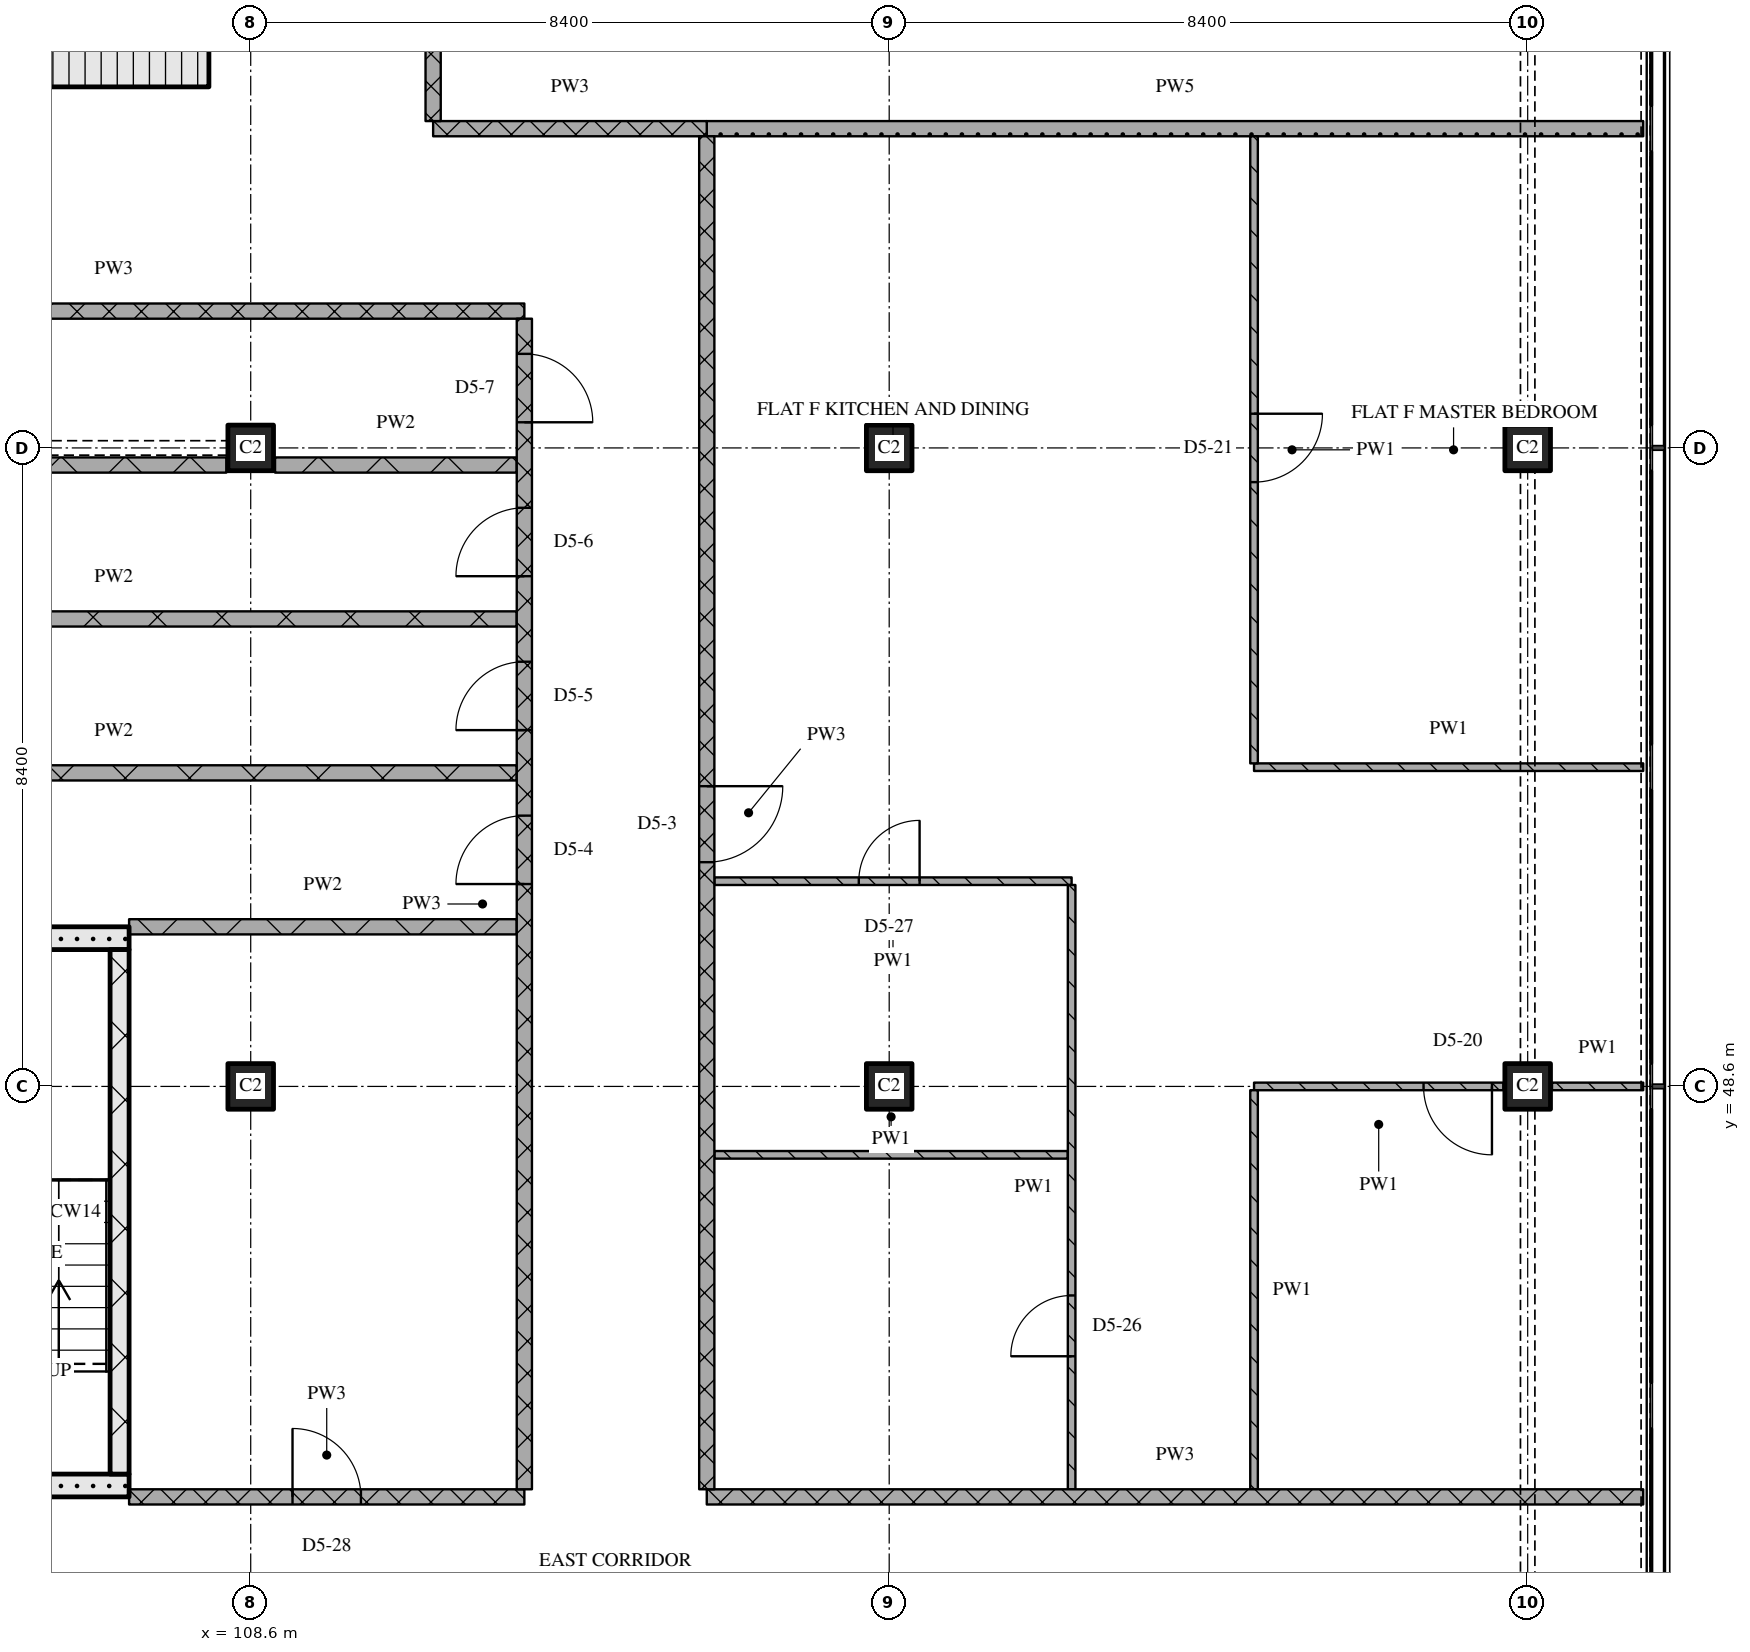
"""IFC4 building model, lengths in metres.
Left out: names, types, materials, properties, quantities, classifications, styles, units other than length and angle.
Written with IfcOpenShell. Run it as: python <this file> out.ifc"""

import sys

from ifc_helpers import new_model, si_unit, direction, frame, frame_2d, origin, origin_2d, place, context, subcontext, project, spatial, rectangle, extrude, element, fill, save


model = new_model("IFC4")
c1 = context("Model", 3, precision=1e-05, world=origin(), true_north=direction((0.0, 1.0)))
c2 = subcontext(c1, "Body", "Model", "MODEL_VIEW")
j1 = project(units=[si_unit("LENGTHUNIT", "METRE"), si_unit("PLANEANGLEUNIT", "RADIAN")], contexts=[c1])
p1 = place(None, origin())
s1 = spatial("IfcSite", under=j1, at=p1, CompositionType="ELEMENT")
p2 = place(p1, origin())
s2 = spatial("IfcBuilding", under=s1, at=p2, CompositionType="ELEMENT")
p3 = place(p2, frame((0.0, 0.0, 248.7)))
s3 = spatial("IfcBuildingStorey", under=s2, at=p3, CompositionType="ELEMENT", Elevation=248.7)
for number, where, z_axis, x_axis in (
    (1, (108.6, 48.6, 0.0), (0.0, 0.0, 1.0), (1.0, 0.0, 0.0)),
    (2, (108.6, 57.0, 0.0), (0.0, 0.0, 1.0), (1.0, 0.0, 0.0)),
    (3, (117.0, 48.6, 0.0), (0.0, 0.0, 1.0), (1.0, 0.0, 0.0)),
    (4, (117.0, 57.0, 0.0), (0.0, 0.0, 1.0), (1.0, 0.0, 0.0)),
    (5, (125.4, 48.6, 0.0), (0.0, 0.0, 1.0), (1.0, 0.0, 0.0)),
    (6, (125.4, 57.0, 0.0), (0.0, 0.0, 1.0), (1.0, 0.0, 0.0)),
):
    element("IfcColumn", number, at=place(p3, frame(where, z_axis=z_axis, x_axis=x_axis)), inside=s3, PredefinedType="COLUMN", context=c2, shape_type="SweptSolid", body=[
        extrude(rectangle(XDim=0.6, YDim=0.6, at=origin_2d()), origin(), (0.0, 0.0, 1.0), 3.6),
    ])
p4 = place(p3, frame((67.15, 62.075, 0.0), z_axis=(0.0, 0.0, 1.0), x_axis=(1.0, 0.0, 0.0)))
e7 = element("IfcWall", 7, at=p4, inside=s3, PredefinedType="SOLIDWALL", context=c2, shape_type="SweptSolid", body=[
    extrude(rectangle(XDim=40.9, YDim=0.65, at=frame_2d((20.45, 0.0))), origin(), (0.0, 0.0, 1.0), 3.3),
])
p5 = place(p4, frame((20.8, 0.0, 0.0)))
e8 = element("IfcOpeningElement", 8, at=p5, cuts=e7, PredefinedType="OPENING", context=c2, shape_type="SweptSolid", body=[
    extrude(rectangle(XDim=1.8, YDim=2.1, at=frame_2d((0.9, 1.05))), frame((0.0, 0.335, 0.0), z_axis=(0.0, -1.0, 0.0), x_axis=(1.0, 0.0, 0.0)), (0.0, 0.0, 1.0), 0.67),
])
p6 = place(p3, frame((101.4, 43.35, 0.0), z_axis=(0.0, 0.0, 1.0), x_axis=(1.0, 0.0, 0.0)))
e9 = element("IfcWall", 9, at=p6, inside=s3, PredefinedType="SOLIDWALL", context=c2, shape_type="SweptSolid", body=[
    extrude(rectangle(XDim=5.6, YDim=0.3, at=frame_2d((2.8, 0.0))), origin(), (0.0, 0.0, 1.0), 3.3),
])
p7 = place(p6, frame((0.725, 0.0, 0.0)))
e10 = element("IfcOpeningElement", 10, at=p7, cuts=e9, PredefinedType="OPENING", context=c2, shape_type="SweptSolid", body=[
    extrude(rectangle(XDim=1.0, YDim=2.1, at=frame_2d((0.5, 1.05))), frame((0.0, 0.16, 0.0), z_axis=(0.0, -1.0, 0.0), x_axis=(1.0, 0.0, 0.0)), (0.0, 0.0, 1.0), 0.32),
])
p8 = place(p3, frame((106.875, 43.5, 0.0), z_axis=(0.0, 0.0, 1.0), x_axis=(0.0, 1.0, 0.0)))
e11 = element("IfcWall", 11, at=p8, inside=s3, PredefinedType="SOLIDWALL", context=c2, shape_type="SweptSolid", body=[
    extrude(rectangle(XDim=6.9, YDim=0.25, at=frame_2d((3.45, 0.0))), origin(), (0.0, 0.0, 1.0), 3.3),
])
p9 = place(p3, frame((101.4, 50.55, 0.0), z_axis=(0.0, 0.0, 1.0), x_axis=(1.0, 0.0, 0.0)))
e12 = element("IfcWall", 12, at=p9, inside=s3, PredefinedType="SOLIDWALL", context=c2, shape_type="SweptSolid", body=[
    extrude(rectangle(XDim=5.6, YDim=0.3, at=frame_2d((2.8, 0.0))), origin(), (0.0, 0.0, 1.0), 3.3),
])
p10 = place(p3, frame((107.0, 43.2, 0.0), z_axis=(0.0, 0.0, 1.0), x_axis=(1.0, 0.0, 0.0)))
e13 = element("IfcWall", 13, at=p10, inside=s3, PredefinedType="PARTITIONING", context=c2, shape_type="SweptSolid", body=[
    extrude(rectangle(XDim=5.2, YDim=0.2, at=frame_2d((2.6, 0.0))), origin(), (0.0, 0.0, 1.0), 3.3),
])
p11 = place(p10, frame((2.15, 0.0, 0.0)))
e14 = element("IfcOpeningElement", 14, at=p11, cuts=e13, PredefinedType="OPENING", context=c2, shape_type="SweptSolid", body=[
    extrude(rectangle(XDim=0.9, YDim=2.1, at=frame_2d((0.45, 1.05))), frame((0.0, 0.11, 0.0), z_axis=(0.0, -1.0, 0.0), x_axis=(1.0, 0.0, 0.0)), (0.0, 0.0, 1.0), 0.22),
])
p12 = place(p3, frame((114.6, 43.2, 0.0), z_axis=(0.0, 0.0, 1.0), x_axis=(1.0, 0.0, 0.0)))
e15 = element("IfcWall", 15, at=p12, inside=s3, PredefinedType="PARTITIONING", context=c2, shape_type="SweptSolid", body=[
    extrude(rectangle(XDim=12.32, YDim=0.2, at=frame_2d((6.16, 0.0))), origin(), (0.0, 0.0, 1.0), 3.3),
])
p13 = place(p3, frame((114.7, 47.7, 0.0), z_axis=(0.0, 0.0, 1.0), x_axis=(1.0, 0.0, 0.0)))
e16 = element("IfcWall", 16, at=p13, inside=s3, PredefinedType="PARTITIONING", context=c2, shape_type="SweptSolid", body=[
    extrude(rectangle(XDim=4.65, YDim=0.1, at=frame_2d((2.325, 0.0))), origin(), (0.0, 0.0, 1.0), 3.3),
])
p14 = place(p3, frame((125.08, 48.6, 0.0), z_axis=(0.0, 0.0, 1.0), x_axis=(-1.0, 0.0, 0.0)))
e17 = element("IfcWall", 17, at=p14, inside=s3, PredefinedType="PARTITIONING", context=c2, shape_type="SweptSolid", body=[
    extrude(rectangle(XDim=3.28, YDim=0.1, at=frame_2d((1.64, 0.0))), origin(), (0.0, 0.0, 1.0), 3.3),
])
p15 = place(p14, frame((0.15, 0.0, 0.0)))
e18 = element("IfcOpeningElement", 18, at=p15, cuts=e17, PredefinedType="OPENING", context=c2, shape_type="SweptSolid", body=[
    extrude(rectangle(XDim=0.9, YDim=2.1, at=frame_2d((0.45, 1.05))), frame((0.0, 0.06, 0.0), z_axis=(0.0, -1.0, 0.0), x_axis=(1.0, 0.0, 0.0)), (0.0, 0.0, 1.0), 0.12),
])
p16 = place(p3, frame((125.72, 48.6, 0.0), z_axis=(0.0, 0.0, 1.0), x_axis=(1.0, 0.0, 0.0)))
e19 = element("IfcWall", 19, at=p16, inside=s3, PredefinedType="PARTITIONING", context=c2, shape_type="SweptSolid", body=[
    extrude(rectangle(XDim=1.2, YDim=0.1, at=frame_2d((0.6, 0.0))), origin(), (0.0, 0.0, 1.0), 3.3),
])
p17 = place(p3, frame((107.0, 50.7, 0.0), z_axis=(0.0, 0.0, 1.0), x_axis=(1.0, 0.0, 0.0)))
e20 = element("IfcWall", 20, at=p17, inside=s3, PredefinedType="PARTITIONING", context=c2, shape_type="SweptSolid", body=[
    extrude(rectangle(XDim=5.1, YDim=0.2, at=frame_2d((2.55, 0.0))), origin(), (0.0, 0.0, 1.0), 3.3),
])
p18 = place(p3, frame((119.4, 51.3, 0.0), z_axis=(0.0, 0.0, 1.0), x_axis=(-1.0, 0.0, 0.0)))
e21 = element("IfcWall", 21, at=p18, inside=s3, PredefinedType="PARTITIONING", context=c2, shape_type="SweptSolid", body=[
    extrude(rectangle(XDim=4.7, YDim=0.1, at=frame_2d((2.35, 0.0))), origin(), (0.0, 0.0, 1.0), 3.3),
])
p19 = place(p18, frame((2.0, 0.0, 0.0)))
e22 = element("IfcOpeningElement", 22, at=p19, cuts=e21, PredefinedType="OPENING", context=c2, shape_type="SweptSolid", body=[
    extrude(rectangle(XDim=0.8, YDim=2.1, at=frame_2d((0.4, 1.05))), frame((0.0, 0.06, 0.0), z_axis=(0.0, -1.0, 0.0), x_axis=(1.0, 0.0, 0.0)), (0.0, 0.0, 1.0), 0.12),
])
p20 = place(p3, frame((101.5, 52.725, 0.0), z_axis=(0.0, 0.0, 1.0), x_axis=(1.0, 0.0, 0.0)))
e23 = element("IfcWall", 23, at=p20, inside=s3, PredefinedType="PARTITIONING", context=c2, shape_type="SweptSolid", body=[
    extrude(rectangle(XDim=10.6, YDim=0.2, at=frame_2d((5.3, 0.0))), origin(), (0.0, 0.0, 1.0), 3.3),
])
p21 = place(p3, frame((121.8, 52.8, 0.0), z_axis=(0.0, 0.0, 1.0), x_axis=(1.0, 0.0, 0.0)))
e24 = element("IfcWall", 24, at=p21, inside=s3, PredefinedType="PARTITIONING", context=c2, shape_type="SweptSolid", body=[
    extrude(rectangle(XDim=5.12, YDim=0.1, at=frame_2d((2.56, 0.0))), origin(), (0.0, 0.0, 1.0), 3.3),
])
p22 = place(p3, frame((101.5, 54.75, 0.0), z_axis=(0.0, 0.0, 1.0), x_axis=(1.0, 0.0, 0.0)))
e25 = element("IfcWall", 25, at=p22, inside=s3, PredefinedType="PARTITIONING", context=c2, shape_type="SweptSolid", body=[
    extrude(rectangle(XDim=10.6, YDim=0.2, at=frame_2d((5.3, 0.0))), origin(), (0.0, 0.0, 1.0), 3.3),
])
p23 = place(p3, frame((101.5, 56.775, 0.0), z_axis=(0.0, 0.0, 1.0), x_axis=(1.0, 0.0, 0.0)))
e26 = element("IfcWall", 26, at=p23, inside=s3, PredefinedType="PARTITIONING", context=c2, shape_type="SweptSolid", body=[
    extrude(rectangle(XDim=6.78, YDim=0.2, at=frame_2d((3.39, 0.0))), origin(), (0.0, 0.0, 1.0), 3.3),
])
p24 = place(p3, frame((108.92, 56.775, 0.0), z_axis=(0.0, 0.0, 1.0), x_axis=(1.0, 0.0, 0.0)))
e27 = element("IfcWall", 27, at=p24, inside=s3, PredefinedType="PARTITIONING", context=c2, shape_type="SweptSolid", body=[
    extrude(rectangle(XDim=3.18, YDim=0.2, at=frame_2d((1.59, 0.0))), origin(), (0.0, 0.0, 1.0), 3.3),
])
p25 = place(p3, frame((101.4, 58.8, 0.0), z_axis=(0.0, 0.0, 1.0), x_axis=(1.0, 0.0, 0.0)))
e28 = element("IfcWall", 28, at=p25, inside=s3, PredefinedType="PARTITIONING", context=c2, shape_type="SweptSolid", body=[
    extrude(rectangle(XDim=10.8, YDim=0.2, at=frame_2d((5.4, 0.0))), origin(), (0.0, 0.0, 1.0), 3.3),
])
p26 = place(p3, frame((111.0, 61.2, 0.0), z_axis=(0.0, 0.0, 1.0), x_axis=(1.0, 0.0, 0.0)))
e29 = element("IfcWall", 29, at=p26, inside=s3, PredefinedType="PARTITIONING", context=c2, shape_type="SweptSolid", body=[
    extrude(rectangle(XDim=3.6, YDim=0.2, at=frame_2d((1.8, 0.0))), origin(), (0.0, 0.0, 1.0), 3.3),
])
p27 = place(p3, frame((114.6, 61.2, 0.0), z_axis=(0.0, 0.0, 1.0), x_axis=(1.0, 0.0, 0.0)))
e30 = element("IfcWall", 30, at=p27, inside=s3, PredefinedType="PARTITIONING", context=c2, shape_type="SweptSolid", body=[
    extrude(rectangle(XDim=12.32, YDim=0.2, at=frame_2d((6.16, 0.0))), origin(), (0.0, 0.0, 1.0), 3.3),
])
p28 = place(p3, frame((111.0, 75.32, 0.0), z_axis=(0.0, 0.0, 1.0), x_axis=(0.0, -1.0, 0.0)))
e31 = element("IfcWall", 31, at=p28, inside=s3, PredefinedType="PARTITIONING", context=c2, shape_type="SweptSolid", body=[
    extrude(rectangle(XDim=14.02, YDim=0.2, at=frame_2d((7.01, 0.0))), origin(), (0.0, 0.0, 1.0), 3.3),
])
p29 = place(p28, frame((6.737, 0.0, 0.0)))
e32 = element("IfcOpeningElement", 32, at=p29, cuts=e31, PredefinedType="OPENING", context=c2, shape_type="SweptSolid", body=[
    extrude(rectangle(XDim=1.2, YDim=2.1, at=frame_2d((0.6, 1.05))), frame((0.0, 0.11, 0.0), z_axis=(0.0, -1.0, 0.0), x_axis=(1.0, 0.0, 0.0)), (0.0, 0.0, 1.0), 0.22),
])
p30 = place(p3, frame((112.2, 43.3, 0.0), z_axis=(0.0, 0.0, 1.0), x_axis=(0.0, 1.0, 0.0)))
e33 = element("IfcWall", 33, at=p30, inside=s3, PredefinedType="PARTITIONING", context=c2, shape_type="SweptSolid", body=[
    extrude(rectangle(XDim=15.4, YDim=0.2, at=frame_2d((7.7, 0.0))), origin(), (0.0, 0.0, 1.0), 3.3),
])
p31 = place(p30, frame((7.962, 0.0, 0.0)))
e34 = element("IfcOpeningElement", 34, at=p31, cuts=e33, PredefinedType="OPENING", context=c2, shape_type="SweptSolid", body=[
    extrude(rectangle(XDim=0.9, YDim=2.1, at=frame_2d((0.45, 1.05))), frame((0.0, 0.11, 0.0), z_axis=(0.0, -1.0, 0.0), x_axis=(1.0, 0.0, 0.0)), (0.0, 0.0, 1.0), 0.22),
])
p32 = place(p30, frame((9.988, 0.0, 0.0)))
e35 = element("IfcOpeningElement", 35, at=p32, cuts=e33, PredefinedType="OPENING", context=c2, shape_type="SweptSolid", body=[
    extrude(rectangle(XDim=0.9, YDim=2.1, at=frame_2d((0.45, 1.05))), frame((0.0, 0.11, 0.0), z_axis=(0.0, -1.0, 0.0), x_axis=(1.0, 0.0, 0.0)), (0.0, 0.0, 1.0), 0.22),
])
p33 = place(p30, frame((12.012, 0.0, 0.0)))
e36 = element("IfcOpeningElement", 36, at=p33, cuts=e33, PredefinedType="OPENING", context=c2, shape_type="SweptSolid", body=[
    extrude(rectangle(XDim=0.9, YDim=2.1, at=frame_2d((0.45, 1.05))), frame((0.0, 0.11, 0.0), z_axis=(0.0, -1.0, 0.0), x_axis=(1.0, 0.0, 0.0)), (0.0, 0.0, 1.0), 0.22),
])
p34 = place(p30, frame((14.038, 0.0, 0.0)))
e37 = element("IfcOpeningElement", 37, at=p34, cuts=e33, PredefinedType="OPENING", context=c2, shape_type="SweptSolid", body=[
    extrude(rectangle(XDim=0.9, YDim=2.1, at=frame_2d((0.45, 1.05))), frame((0.0, 0.11, 0.0), z_axis=(0.0, -1.0, 0.0), x_axis=(1.0, 0.0, 0.0)), (0.0, 0.0, 1.0), 0.22),
])
p35 = place(p3, frame((114.6, 61.1, 0.0), z_axis=(0.0, 0.0, 1.0), x_axis=(0.0, -1.0, 0.0)))
e38 = element("IfcWall", 38, at=p35, inside=s3, PredefinedType="PARTITIONING", context=c2, shape_type="SweptSolid", body=[
    extrude(rectangle(XDim=17.8, YDim=0.2, at=frame_2d((8.9, 0.0))), origin(), (0.0, 0.0, 1.0), 3.3),
])
p36 = place(p35, frame((8.55, 0.0, 0.0)))
e39 = element("IfcOpeningElement", 39, at=p36, cuts=e38, PredefinedType="OPENING", context=c2, shape_type="SweptSolid", body=[
    extrude(rectangle(XDim=1.0, YDim=2.1, at=frame_2d((0.5, 1.05))), frame((0.0, 0.11, 0.0), z_axis=(0.0, -1.0, 0.0), x_axis=(1.0, 0.0, 0.0)), (0.0, 0.0, 1.0), 0.22),
])
p37 = place(p3, frame((119.4, 43.3, 0.0), z_axis=(0.0, 0.0, 1.0), x_axis=(0.0, 1.0, 0.0)))
e40 = element("IfcWall", 40, at=p37, inside=s3, PredefinedType="PARTITIONING", context=c2, shape_type="SweptSolid", body=[
    extrude(rectangle(XDim=7.95, YDim=0.1, at=frame_2d((3.975, 0.0))), origin(), (0.0, 0.0, 1.0), 3.3),
])
p38 = place(p37, frame((1.75, 0.0, 0.0)))
e41 = element("IfcOpeningElement", 41, at=p38, cuts=e40, PredefinedType="OPENING", context=c2, shape_type="SweptSolid", body=[
    extrude(rectangle(XDim=0.8, YDim=2.1, at=frame_2d((0.4, 1.05))), frame((0.0, 0.06, 0.0), z_axis=(0.0, -1.0, 0.0), x_axis=(1.0, 0.0, 0.0)), (0.0, 0.0, 1.0), 0.12),
])
p39 = place(p3, frame((121.8, 48.55, 0.0), z_axis=(0.0, 0.0, 1.0), x_axis=(0.0, -1.0, 0.0)))
e42 = element("IfcWall", 42, at=p39, inside=s3, PredefinedType="PARTITIONING", context=c2, shape_type="SweptSolid", body=[
    extrude(rectangle(XDim=5.25, YDim=0.1, at=frame_2d((2.625, 0.0))), origin(), (0.0, 0.0, 1.0), 3.3),
])
p40 = place(p3, frame((121.8, 61.1, 0.0), z_axis=(0.0, 0.0, 1.0), x_axis=(0.0, -1.0, 0.0)))
e43 = element("IfcWall", 43, at=p40, inside=s3, PredefinedType="PARTITIONING", context=c2, shape_type="SweptSolid", body=[
    extrude(rectangle(XDim=8.25, YDim=0.1, at=frame_2d((4.125, 0.0))), origin(), (0.0, 0.0, 1.0), 3.3),
])
p41 = place(p40, frame((3.65, 0.0, 0.0)))
e44 = element("IfcOpeningElement", 44, at=p41, cuts=e43, PredefinedType="OPENING", context=c2, shape_type="SweptSolid", body=[
    extrude(rectangle(XDim=0.9, YDim=2.1, at=frame_2d((0.45, 1.05))), frame((0.0, 0.06, 0.0), z_axis=(0.0, -1.0, 0.0), x_axis=(1.0, 0.0, 0.0)), (0.0, 0.0, 1.0), 0.12),
])
p42 = place(p11, origin())
e45 = element("IfcDoor", 45, at=p42, inside=s3, OperationType="SINGLE_SWING_LEFT", PredefinedType="DOOR", context=c2, shape_type="SweptSolid", body=[
    extrude(rectangle(XDim=0.9, YDim=2.1, at=frame_2d((0.45, 1.05))), frame((0.0, 0.025, 0.0), z_axis=(0.0, -1.0, 0.0), x_axis=(1.0, 0.0, 0.0)), (0.0, 0.0, 1.0), 0.05),
])
fill(e14, e45)
p43 = place(p15, origin())
e46 = element("IfcDoor", 46, at=p43, inside=s3, OperationType="SINGLE_SWING_LEFT", PredefinedType="DOOR", context=c2, shape_type="SweptSolid", body=[
    extrude(rectangle(XDim=0.9, YDim=2.1, at=frame_2d((0.45, 1.05))), frame((0.0, 0.025, 0.0), z_axis=(0.0, -1.0, 0.0), x_axis=(1.0, 0.0, 0.0)), (0.0, 0.0, 1.0), 0.05),
])
fill(e18, e46)
p44 = place(p19, origin())
e47 = element("IfcDoor", 47, at=p44, inside=s3, OperationType="SINGLE_SWING_RIGHT", PredefinedType="DOOR", context=c2, shape_type="SweptSolid", body=[
    extrude(rectangle(XDim=0.8, YDim=2.1, at=frame_2d((0.4, 1.05))), frame((0.0, 0.025, 0.0), z_axis=(0.0, -1.0, 0.0), x_axis=(1.0, 0.0, 0.0)), (0.0, 0.0, 1.0), 0.05),
])
fill(e22, e47)
p45 = place(p31, origin())
e48 = element("IfcDoor", 48, at=p45, inside=s3, OperationType="SINGLE_SWING_LEFT", PredefinedType="DOOR", context=c2, shape_type="SweptSolid", body=[
    extrude(rectangle(XDim=0.9, YDim=2.1, at=frame_2d((0.45, 1.05))), frame((0.0, 0.025, 0.0), z_axis=(0.0, -1.0, 0.0), x_axis=(1.0, 0.0, 0.0)), (0.0, 0.0, 1.0), 0.05),
])
fill(e34, e48)
p46 = place(p32, origin())
e49 = element("IfcDoor", 49, at=p46, inside=s3, OperationType="SINGLE_SWING_LEFT", PredefinedType="DOOR", context=c2, shape_type="SweptSolid", body=[
    extrude(rectangle(XDim=0.9, YDim=2.1, at=frame_2d((0.45, 1.05))), frame((0.0, 0.025, 0.0), z_axis=(0.0, -1.0, 0.0), x_axis=(1.0, 0.0, 0.0)), (0.0, 0.0, 1.0), 0.05),
])
fill(e35, e49)
p47 = place(p33, origin())
e50 = element("IfcDoor", 50, at=p47, inside=s3, OperationType="SINGLE_SWING_LEFT", PredefinedType="DOOR", context=c2, shape_type="SweptSolid", body=[
    extrude(rectangle(XDim=0.9, YDim=2.1, at=frame_2d((0.45, 1.05))), frame((0.0, 0.025, 0.0), z_axis=(0.0, -1.0, 0.0), x_axis=(1.0, 0.0, 0.0)), (0.0, 0.0, 1.0), 0.05),
])
fill(e36, e50)
p48 = place(p34, origin())
e51 = element("IfcDoor", 51, at=p48, inside=s3, OperationType="SINGLE_SWING_RIGHT", PredefinedType="DOOR", context=c2, shape_type="SweptSolid", body=[
    extrude(rectangle(XDim=0.9, YDim=2.1, at=frame_2d((0.45, 1.05))), frame((0.0, 0.025, 0.0), z_axis=(0.0, -1.0, 0.0), x_axis=(1.0, 0.0, 0.0)), (0.0, 0.0, 1.0), 0.05),
])
fill(e37, e51)
p49 = place(p36, origin())
e52 = element("IfcDoor", 52, at=p49, inside=s3, OperationType="SINGLE_SWING_LEFT", PredefinedType="DOOR", context=c2, shape_type="SweptSolid", body=[
    extrude(rectangle(XDim=1.0, YDim=2.1, at=frame_2d((0.5, 1.05))), frame((0.0, 0.025, 0.0), z_axis=(0.0, -1.0, 0.0), x_axis=(1.0, 0.0, 0.0)), (0.0, 0.0, 1.0), 0.05),
])
fill(e39, e52)
p50 = place(p38, origin())
e53 = element("IfcDoor", 53, at=p50, inside=s3, OperationType="SINGLE_SWING_LEFT", PredefinedType="DOOR", context=c2, shape_type="SweptSolid", body=[
    extrude(rectangle(XDim=0.8, YDim=2.1, at=frame_2d((0.4, 1.05))), frame((0.0, 0.025, 0.0), z_axis=(0.0, -1.0, 0.0), x_axis=(1.0, 0.0, 0.0)), (0.0, 0.0, 1.0), 0.05),
])
fill(e41, e53)
p51 = place(p41, origin())
e54 = element("IfcDoor", 54, at=p51, inside=s3, OperationType="SINGLE_SWING_LEFT", PredefinedType="DOOR", context=c2, shape_type="SweptSolid", body=[
    extrude(rectangle(XDim=0.9, YDim=2.1, at=frame_2d((0.45, 1.05))), frame((0.0, 0.025, 0.0), z_axis=(0.0, -1.0, 0.0), x_axis=(1.0, 0.0, 0.0)), (0.0, 0.0, 1.0), 0.05),
])
fill(e44, e54)
save(model, sys.argv[1])
